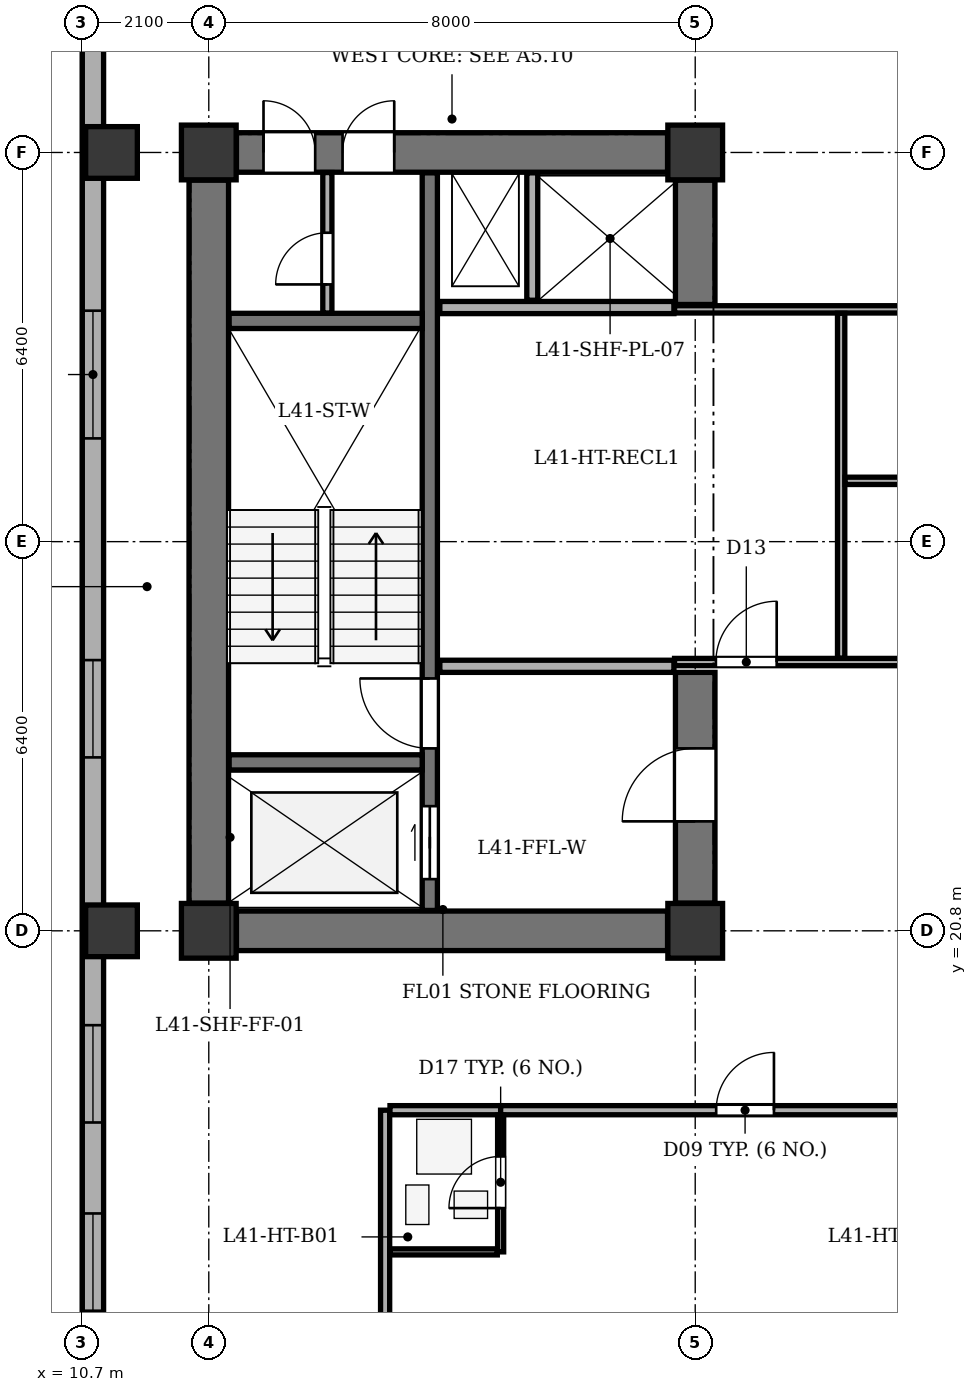
"""IFC4 building model, lengths in metres.
Left out: names, types, materials, properties, quantities, classifications, styles, units other than length and angle.
Written with IfcOpenShell. Run it as: python <this file> out.ifc"""

import sys

from ifc_helpers import new_model, si_unit, direction, frame, frame_2d, origin, origin_2d, place, context, subcontext, project, spatial, rectangle, extrude, element, fill, save


model = new_model("IFC4")
c1 = context("Model", 3, precision=1e-05, world=origin(), true_north=direction((0.0, 1.0)))
c2 = subcontext(c1, "Body", "Model", "MODEL_VIEW")
j1 = project(units=[si_unit("LENGTHUNIT", "METRE"), si_unit("PLANEANGLEUNIT", "RADIAN")], contexts=[c1])
p1 = place(None, origin())
s1 = spatial("IfcSite", under=j1, at=p1, CompositionType="ELEMENT")
p2 = place(p1, origin())
s2 = spatial("IfcBuilding", under=s1, at=p2, CompositionType="ELEMENT")
p3 = place(p2, frame((0.0, 0.0, 162.3)))
s3 = spatial("IfcBuildingStorey", under=s2, at=p3, CompositionType="ELEMENT", Elevation=162.3)
for number, where, z_axis, x_axis in (
    (1, (12.8, 20.8, 0.0), (0.0, 0.0, 1.0), (1.0, 0.0, 0.0)),
    (2, (20.8, 20.8, 0.0), (0.0, 0.0, 1.0), (1.0, 0.0, 0.0)),
    (3, (12.8, 33.6, 0.0), (0.0, 0.0, 1.0), (1.0, 0.0, 0.0)),
    (4, (20.8, 33.6, 0.0), (0.0, 0.0, 1.0), (1.0, 0.0, 0.0)),
):
    element("IfcColumn", number, at=place(p3, frame(where, z_axis=z_axis, x_axis=x_axis)), inside=s3, PredefinedType="COLUMN", context=c2, shape_type="SweptSolid", body=[
        extrude(rectangle(XDim=0.9, YDim=0.9, at=origin_2d()), origin(), (0.0, 0.0, 1.0), 3.5),
    ])
for number, where, z_axis, x_axis in (
    (5, (11.2, 20.8, 0.0), (0.0, 0.0, 1.0), (1.0, 0.0, 0.0)),
    (6, (11.2, 33.6, 0.0), (0.0, 0.0, 1.0), (1.0, 0.0, 0.0)),
):
    element("IfcColumn", number, at=place(p3, frame(where, z_axis=z_axis, x_axis=x_axis)), inside=s3, PredefinedType="COLUMN", context=c2, shape_type="SweptSolid", body=[
        extrude(rectangle(XDim=0.85, YDim=0.85, at=origin_2d()), origin(), (0.0, 0.0, 1.0), 3.5),
    ])
p4 = place(p3, frame((10.895, 12.9, 0.0), z_axis=(0.0, 0.0, 1.0), x_axis=(0.0, 1.0, 0.0)))
e7 = element("IfcWall", 7, at=p4, inside=s3, PredefinedType="STANDARD", context=c2, shape_type="SweptSolid", body=[
    extrude(rectangle(XDim=35.0, YDim=0.35, at=frame_2d((17.5, 0.0))), origin(), (0.0, 0.0, 1.0), 2.785),
])
p5 = place(p4, frame((1.652, 0.0, 0.75)))
e8 = element("IfcOpeningElement", 8, at=p5, cuts=e7, PredefinedType="OPENING", context=c2, shape_type="SweptSolid", body=[
    extrude(rectangle(XDim=1.6, YDim=1.75, at=frame_2d((0.8, 0.875))), frame((0.0, 0.185, 0.0), z_axis=(0.0, -1.0, 0.0), x_axis=(1.0, 0.0, 0.0)), (0.0, 0.0, 1.0), 0.37),
])
p6 = place(p4, frame((4.748, 0.0, 0.75)))
e9 = element("IfcOpeningElement", 9, at=p6, cuts=e7, PredefinedType="OPENING", context=c2, shape_type="SweptSolid", body=[
    extrude(rectangle(XDim=1.6, YDim=1.75, at=frame_2d((0.8, 0.875))), frame((0.0, 0.185, 0.0), z_axis=(0.0, -1.0, 0.0), x_axis=(1.0, 0.0, 0.0)), (0.0, 0.0, 1.0), 0.37),
])
p7 = place(p4, frame((10.752, 0.0, 0.75)))
e10 = element("IfcOpeningElement", 10, at=p7, cuts=e7, PredefinedType="OPENING", context=c2, shape_type="SweptSolid", body=[
    extrude(rectangle(XDim=1.6, YDim=1.75, at=frame_2d((0.8, 0.875))), frame((0.0, 0.185, 0.0), z_axis=(0.0, -1.0, 0.0), x_axis=(1.0, 0.0, 0.0)), (0.0, 0.0, 1.0), 0.37),
])
p8 = place(p4, frame((15.998, 0.0, 0.75)))
e11 = element("IfcOpeningElement", 11, at=p8, cuts=e7, PredefinedType="OPENING", context=c2, shape_type="SweptSolid", body=[
    extrude(rectangle(XDim=2.1, YDim=1.75, at=frame_2d((1.05, 0.875))), frame((0.0, 0.185, 0.0), z_axis=(0.0, -1.0, 0.0), x_axis=(1.0, 0.0, 0.0)), (0.0, 0.0, 1.0), 0.37),
])
p9 = place(p4, frame((23.916, 0.0, 0.75)))
e12 = element("IfcOpeningElement", 12, at=p9, cuts=e7, PredefinedType="OPENING", context=c2, shape_type="SweptSolid", body=[
    extrude(rectangle(XDim=1.6, YDim=1.75, at=frame_2d((0.8, 0.875))), frame((0.0, 0.185, 0.0), z_axis=(0.0, -1.0, 0.0), x_axis=(1.0, 0.0, 0.0)), (0.0, 0.0, 1.0), 0.37),
])
p10 = place(p4, frame((29.834, 0.0, 0.75)))
e13 = element("IfcOpeningElement", 13, at=p10, cuts=e7, PredefinedType="OPENING", context=c2, shape_type="SweptSolid", body=[
    extrude(rectangle(XDim=2.1, YDim=1.75, at=frame_2d((1.05, 0.875))), frame((0.0, 0.185, 0.0), z_axis=(0.0, -1.0, 0.0), x_axis=(1.0, 0.0, 0.0)), (0.0, 0.0, 1.0), 0.37),
])
p11 = place(p3, frame((12.8, 21.255, 0.0), z_axis=(0.0, 0.0, 1.0), x_axis=(0.0, 1.0, 0.0)))
e14 = element("IfcWall", 14, at=p11, inside=s3, PredefinedType="SHEAR", context=c2, shape_type="SweptSolid", body=[
    extrude(rectangle(XDim=11.89, YDim=0.65, at=frame_2d((5.945, 0.0))), origin(), (0.0, 0.0, 1.0), 3.2),
])
p12 = place(p3, frame((13.255, 20.8, 0.0), z_axis=(0.0, 0.0, 1.0), x_axis=(1.0, 0.0, 0.0)))
e15 = element("IfcWall", 15, at=p12, inside=s3, PredefinedType="SHEAR", context=c2, shape_type="SweptSolid", body=[
    extrude(rectangle(XDim=7.09, YDim=0.65, at=frame_2d((3.545, 0.0))), origin(), (0.0, 0.0, 1.0), 3.2),
])
p13 = place(p3, frame((13.255, 33.6, 0.0), z_axis=(0.0, 0.0, 1.0), x_axis=(1.0, 0.0, 0.0)))
e16 = element("IfcWall", 16, at=p13, inside=s3, PredefinedType="SHEAR", context=c2, shape_type="SweptSolid", body=[
    extrude(rectangle(XDim=7.09, YDim=0.65, at=frame_2d((3.545, 0.0))), origin(), (0.0, 0.0, 1.0), 3.2),
])
p14 = place(p13, frame((0.445, 0.0, 0.0)))
e17 = element("IfcOpeningElement", 17, at=p14, cuts=e16, PredefinedType="OPENING", context=c2, shape_type="SweptSolid", body=[
    extrude(rectangle(XDim=0.85, YDim=2.02, at=frame_2d((0.425, 1.01))), frame((0.0, 0.335, 0.0), z_axis=(0.0, -1.0, 0.0), x_axis=(1.0, 0.0, 0.0)), (0.0, 0.0, 1.0), 0.67),
])
p15 = place(p13, frame((1.745, 0.0, 0.0)))
e18 = element("IfcOpeningElement", 18, at=p15, cuts=e16, PredefinedType="OPENING", context=c2, shape_type="SweptSolid", body=[
    extrude(rectangle(XDim=0.85, YDim=2.02, at=frame_2d((0.425, 1.01))), frame((0.0, 0.335, 0.0), z_axis=(0.0, -1.0, 0.0), x_axis=(1.0, 0.0, 0.0)), (0.0, 0.0, 1.0), 0.67),
])
p16 = place(p3, frame((20.8, 21.255, 0.0), z_axis=(0.0, 0.0, 1.0), x_axis=(0.0, 1.0, 0.0)))
e19 = element("IfcWall", 19, at=p16, inside=s3, PredefinedType="SHEAR", context=c2, shape_type="SweptSolid", body=[
    extrude(rectangle(XDim=3.795, YDim=0.65, at=frame_2d((1.897, 0.0))), origin(), (0.0, 0.0, 1.0), 3.2),
])
p17 = place(p16, frame((1.345, 0.0, 0.0)))
e20 = element("IfcOpeningElement", 20, at=p17, cuts=e19, PredefinedType="OPENING", context=c2, shape_type="SweptSolid", body=[
    extrude(rectangle(XDim=1.2, YDim=2.15, at=frame_2d((0.6, 1.075))), frame((0.0, 0.335, 0.0), z_axis=(0.0, -1.0, 0.0), x_axis=(1.0, 0.0, 0.0)), (0.0, 0.0, 1.0), 0.67),
])
p18 = place(p3, frame((20.8, 31.1, 0.0), z_axis=(0.0, 0.0, 1.0), x_axis=(0.0, 1.0, 0.0)))
e21 = element("IfcWall", 21, at=p18, inside=s3, PredefinedType="SHEAR", context=c2, shape_type="SweptSolid", body=[
    extrude(rectangle(XDim=2.045, YDim=0.65, at=frame_2d((1.022, 0.0))), origin(), (0.0, 0.0, 1.0), 3.2),
])
p19 = place(p3, frame((16.435, 21.135, 0.0), z_axis=(0.0, 0.0, 1.0), x_axis=(0.0, 1.0, 0.0)))
e22 = element("IfcWall", 22, at=p19, inside=s3, PredefinedType="SHEAR", context=c2, shape_type="SweptSolid", body=[
    extrude(rectangle(XDim=12.13, YDim=0.25, at=frame_2d((6.065, 0.0))), origin(), (0.0, 0.0, 1.0), 3.2),
])
p20 = place(p19, frame((0.515, 0.0, 0.0)))
e23 = element("IfcOpeningElement", 23, at=p20, cuts=e22, PredefinedType="OPENING", context=c2, shape_type="SweptSolid", body=[
    extrude(rectangle(XDim=1.2, YDim=2.15, at=frame_2d((0.6, 1.075))), frame((0.0, 0.135, 0.0), z_axis=(0.0, -1.0, 0.0), x_axis=(1.0, 0.0, 0.0)), (0.0, 0.0, 1.0), 0.27),
])
p21 = place(p19, frame((2.665, 0.0, 0.0)))
e24 = element("IfcOpeningElement", 24, at=p21, cuts=e22, PredefinedType="OPENING", context=c2, shape_type="SweptSolid", body=[
    extrude(rectangle(XDim=1.15, YDim=2.15, at=frame_2d((0.575, 1.075))), frame((0.0, 0.135, 0.0), z_axis=(0.0, -1.0, 0.0), x_axis=(1.0, 0.0, 0.0)), (0.0, 0.0, 1.0), 0.27),
])
for number, where, z_axis, x_axis in (
    (25, (13.135, 23.57, 0.0), (0.0, 0.0, 1.0), (1.0, 0.0, 0.0)),
    (26, (13.135, 30.83, 0.0), (0.0, 0.0, 1.0), (1.0, 0.0, 0.0)),
):
    element("IfcWall", number, at=place(p3, frame(where, z_axis=z_axis, x_axis=x_axis)), inside=s3, PredefinedType="SHEAR", context=c2, shape_type="SweptSolid", body=[
        extrude(rectangle(XDim=3.175, YDim=0.25, at=frame_2d((1.587, 0.0))), origin(), (0.0, 0.0, 1.0), 3.2),
    ])
for number, where, z_axis, x_axis in (
    (27, (16.6, 25.15, 0.0), (0.0, 0.0, 1.0), (1.0, 0.0, 0.0)),
    (28, (16.6, 31.05, 0.0), (0.0, 0.0, 1.0), (1.0, 0.0, 0.0)),
):
    element("IfcWall", number, at=place(p3, frame(where, z_axis=z_axis, x_axis=x_axis)), inside=s3, PredefinedType="SOLIDWALL", context=c2, shape_type="SweptSolid", body=[
        extrude(rectangle(XDim=3.85, YDim=0.2, at=frame_2d((1.925, 0.0))), origin(), (0.0, 0.0, 1.0), 3.2),
    ])
p22 = place(p3, frame((18.12, 31.17, 0.0), z_axis=(0.0, 0.0, 1.0), x_axis=(0.0, 1.0, 0.0)))
e29 = element("IfcWall", 29, at=p22, inside=s3, PredefinedType="PARTITIONING", context=c2, shape_type="SweptSolid", body=[
    extrude(rectangle(XDim=2.095, YDim=0.18, at=frame_2d((1.047, 0.0))), origin(), (0.0, 0.0, 1.0), 3.2),
])
p23 = place(p3, frame((14.75, 30.96, 0.0), z_axis=(0.0, 0.0, 1.0), x_axis=(0.0, 1.0, 0.0)))
e30 = element("IfcWall", 30, at=p23, inside=s3, PredefinedType="PARTITIONING", context=c2, shape_type="SweptSolid", body=[
    extrude(rectangle(XDim=2.31, YDim=0.15, at=frame_2d((1.155, 0.0))), origin(), (0.0, 0.0, 1.0), 3.2),
])
p24 = place(p23, frame((0.47, 0.0, 0.0)))
e31 = element("IfcOpeningElement", 31, at=p24, cuts=e30, PredefinedType="OPENING", context=c2, shape_type="SweptSolid", body=[
    extrude(rectangle(XDim=0.85, YDim=2.02, at=frame_2d((0.425, 1.01))), frame((0.0, 0.085, 0.0), z_axis=(0.0, -1.0, 0.0), x_axis=(1.0, 0.0, 0.0)), (0.0, 0.0, 1.0), 0.17),
])
p25 = place(p3, frame((20.46, 25.22, 0.0), z_axis=(0.0, 0.0, 1.0), x_axis=(1.0, 0.0, 0.0)))
e32 = element("IfcWall", 32, at=p25, inside=s3, PredefinedType="PARTITIONING", context=c2, shape_type="SweptSolid", body=[
    extrude(rectangle(XDim=11.94, YDim=0.12, at=frame_2d((5.97, 0.0))), origin(), (0.0, 0.0, 1.0), 3.2),
])
p26 = place(p25, frame((0.68, 0.0, 0.0)))
e33 = element("IfcOpeningElement", 33, at=p26, cuts=e32, PredefinedType="OPENING", context=c2, shape_type="SweptSolid", body=[
    extrude(rectangle(XDim=1.0, YDim=2.1, at=frame_2d((0.5, 1.05))), frame((0.0, 0.07, 0.0), z_axis=(0.0, -1.0, 0.0), x_axis=(1.0, 0.0, 0.0)), (0.0, 0.0, 1.0), 0.14),
])
p27 = place(p3, frame((20.46, 31.02, 0.0), z_axis=(0.0, 0.0, 1.0), x_axis=(1.0, 0.0, 0.0)))
e34 = element("IfcWall", 34, at=p27, inside=s3, PredefinedType="PARTITIONING", context=c2, shape_type="SweptSolid", body=[
    extrude(rectangle(XDim=11.94, YDim=0.12, at=frame_2d((5.97, 0.0))), origin(), (0.0, 0.0, 1.0), 3.2),
])
p28 = place(p3, frame((23.2, 25.285, 0.0), z_axis=(0.0, 0.0, 1.0), x_axis=(0.0, 1.0, 0.0)))
e35 = element("IfcWall", 35, at=p28, inside=s3, PredefinedType="PARTITIONING", context=c2, shape_type="SweptSolid", body=[
    extrude(rectangle(XDim=5.67, YDim=0.12, at=frame_2d((2.835, 0.0))), origin(), (0.0, 0.0, 1.0), 3.2),
])
p29 = place(p3, frame((23.265, 28.2, 0.0), z_axis=(0.0, 0.0, 1.0), x_axis=(1.0, 0.0, 0.0)))
e36 = element("IfcWall", 36, at=p29, inside=s3, PredefinedType="PARTITIONING", context=c2, shape_type="SweptSolid", body=[
    extrude(rectangle(XDim=9.07, YDim=0.12, at=frame_2d((4.535, 0.0))), origin(), (0.0, 0.0, 1.0), 3.2),
])
p30 = place(p3, frame((15.7, 8.275, 0.0), z_axis=(0.0, 0.0, 1.0), x_axis=(0.0, 1.0, 0.0)))
e37 = element("IfcWall", 37, at=p30, inside=s3, PredefinedType="PARTITIONING", context=c2, shape_type="SweptSolid", body=[
    extrude(rectangle(XDim=9.575, YDim=0.15, at=frame_2d((4.788, 0.0))), origin(), (0.0, 0.0, 1.0), 3.2),
])
p31 = place(p3, frame((15.78, 17.85, 0.0), z_axis=(0.0, 0.0, 1.0), x_axis=(1.0, 0.0, 0.0)))
e38 = element("IfcWall", 38, at=p31, inside=s3, PredefinedType="PARTITIONING", context=c2, shape_type="SweptSolid", body=[
    extrude(rectangle(XDim=1.82, YDim=0.15, at=frame_2d((0.91, 0.0))), origin(), (0.0, 0.0, 1.0), 3.2),
])
p32 = place(p3, frame((17.6, 17.85, 0.0), z_axis=(0.0, 0.0, 1.0), x_axis=(1.0, 0.0, 0.0)))
e39 = element("IfcWall", 39, at=p32, inside=s3, PredefinedType="PARTITIONING", context=c2, shape_type="SweptSolid", body=[
    extrude(rectangle(XDim=8.049, YDim=0.15, at=frame_2d((4.024, 0.0))), origin(), (0.0, 0.0, 1.0), 3.2),
])
p33 = place(p32, frame((3.545, 0.0, 0.0)))
e40 = element("IfcOpeningElement", 40, at=p33, cuts=e39, PredefinedType="OPENING", context=c2, shape_type="SweptSolid", body=[
    extrude(rectangle(XDim=0.95, YDim=2.1, at=frame_2d((0.475, 1.05))), frame((0.0, 0.085, 0.0), z_axis=(0.0, -1.0, 0.0), x_axis=(1.0, 0.0, 0.0)), (0.0, 0.0, 1.0), 0.17),
])
p34 = place(p3, frame((17.6, 15.52, 0.0), z_axis=(0.0, 0.0, 1.0), x_axis=(0.0, 1.0, 0.0)))
e41 = element("IfcWall", 41, at=p34, inside=s3, PredefinedType="PARTITIONING", context=c2, shape_type="SweptSolid", body=[
    extrude(rectangle(XDim=2.25, YDim=0.1, at=frame_2d((1.125, 0.0))), origin(), (0.0, 0.0, 1.0), 3.2),
])
p35 = place(p34, frame((0.72, 0.0, 0.0)))
e42 = element("IfcOpeningElement", 42, at=p35, cuts=e41, PredefinedType="OPENING", context=c2, shape_type="SweptSolid", body=[
    extrude(rectangle(XDim=0.85, YDim=2.05, at=frame_2d((0.425, 1.025))), frame((0.0, 0.06, 0.0), z_axis=(0.0, -1.0, 0.0), x_axis=(1.0, 0.0, 0.0)), (0.0, 0.0, 1.0), 0.12),
])
p36 = place(p3, frame((15.78, 15.52, 0.0), z_axis=(0.0, 0.0, 1.0), x_axis=(1.0, 0.0, 0.0)))
e43 = element("IfcWall", 43, at=p36, inside=s3, PredefinedType="PARTITIONING", context=c2, shape_type="SweptSolid", body=[
    extrude(rectangle(XDim=1.765, YDim=0.1, at=frame_2d((0.882, 0.0))), origin(), (0.0, 0.0, 1.0), 3.2),
])
p37 = place(p5, origin())
e44 = element("IfcWindow", 44, at=p37, inside=s3, PartitioningType="SINGLE_PANEL", PredefinedType="WINDOW", context=c2, shape_type="SweptSolid", body=[
    extrude(rectangle(XDim=1.6, YDim=1.75, at=frame_2d((0.8, 0.875))), frame((0.0, -0.01, 0.0), z_axis=(0.0, -1.0, 0.0), x_axis=(1.0, 0.0, 0.0)), (0.0, 0.0, 1.0), 0.06),
])
fill(e8, e44)
p38 = place(p6, origin())
e45 = element("IfcWindow", 45, at=p38, inside=s3, PartitioningType="SINGLE_PANEL", PredefinedType="WINDOW", context=c2, shape_type="SweptSolid", body=[
    extrude(rectangle(XDim=1.6, YDim=1.75, at=frame_2d((0.8, 0.875))), frame((0.0, -0.01, 0.0), z_axis=(0.0, -1.0, 0.0), x_axis=(1.0, 0.0, 0.0)), (0.0, 0.0, 1.0), 0.06),
])
fill(e9, e45)
p39 = place(p7, origin())
e46 = element("IfcWindow", 46, at=p39, inside=s3, PartitioningType="SINGLE_PANEL", PredefinedType="WINDOW", context=c2, shape_type="SweptSolid", body=[
    extrude(rectangle(XDim=1.6, YDim=1.75, at=frame_2d((0.8, 0.875))), frame((0.0, -0.01, 0.0), z_axis=(0.0, -1.0, 0.0), x_axis=(1.0, 0.0, 0.0)), (0.0, 0.0, 1.0), 0.06),
])
fill(e10, e46)
p40 = place(p8, origin())
e47 = element("IfcWindow", 47, at=p40, inside=s3, PartitioningType="SINGLE_PANEL", PredefinedType="WINDOW", context=c2, shape_type="SweptSolid", body=[
    extrude(rectangle(XDim=2.1, YDim=1.75, at=frame_2d((1.05, 0.875))), frame((0.0, -0.01, 0.0), z_axis=(0.0, -1.0, 0.0), x_axis=(1.0, 0.0, 0.0)), (0.0, 0.0, 1.0), 0.06),
])
fill(e11, e47)
p41 = place(p14, origin())
e48 = element("IfcDoor", 48, at=p41, inside=s3, OperationType="SINGLE_SWING_LEFT", PredefinedType="DOOR", context=c2, shape_type="SweptSolid", body=[
    extrude(rectangle(XDim=0.85, YDim=2.02, at=frame_2d((0.425, 1.01))), frame((0.0, 0.025, 0.0), z_axis=(0.0, -1.0, 0.0), x_axis=(1.0, 0.0, 0.0)), (0.0, 0.0, 1.0), 0.05),
])
fill(e17, e48)
p42 = place(p15, origin())
e49 = element("IfcDoor", 49, at=p42, inside=s3, OperationType="SINGLE_SWING_RIGHT", PredefinedType="DOOR", context=c2, shape_type="SweptSolid", body=[
    extrude(rectangle(XDim=0.85, YDim=2.02, at=frame_2d((0.425, 1.01))), frame((0.0, 0.025, 0.0), z_axis=(0.0, -1.0, 0.0), x_axis=(1.0, 0.0, 0.0)), (0.0, 0.0, 1.0), 0.05),
])
fill(e18, e49)
p43 = place(p17, origin())
e50 = element("IfcDoor", 50, at=p43, inside=s3, OperationType="SINGLE_SWING_LEFT", PredefinedType="DOOR", context=c2, shape_type="SweptSolid", body=[
    extrude(rectangle(XDim=1.2, YDim=2.15, at=frame_2d((0.6, 1.075))), frame((0.0, 0.025, 0.0), z_axis=(0.0, -1.0, 0.0), x_axis=(1.0, 0.0, 0.0)), (0.0, 0.0, 1.0), 0.05),
])
fill(e20, e50)
p44 = place(p20, origin())
e51 = element("IfcDoor", 51, at=p44, inside=s3, OperationType="DOUBLE_DOOR_SLIDING", PredefinedType="DOOR", context=c2, shape_type="SweptSolid", body=[
    extrude(rectangle(XDim=1.2, YDim=2.15, at=frame_2d((0.6, 1.075))), frame((0.0, 0.025, 0.0), z_axis=(0.0, -1.0, 0.0), x_axis=(1.0, 0.0, 0.0)), (0.0, 0.0, 1.0), 0.05),
])
fill(e23, e51)
p45 = place(p21, origin())
e52 = element("IfcDoor", 52, at=p45, inside=s3, OperationType="SINGLE_SWING_RIGHT", PredefinedType="DOOR", context=c2, shape_type="SweptSolid", body=[
    extrude(rectangle(XDim=1.15, YDim=2.15, at=frame_2d((0.575, 1.075))), frame((0.0, 0.025, 0.0), z_axis=(0.0, -1.0, 0.0), x_axis=(1.0, 0.0, 0.0)), (0.0, 0.0, 1.0), 0.05),
])
fill(e24, e52)
p46 = place(p24, origin())
e53 = element("IfcDoor", 53, at=p46, inside=s3, OperationType="SINGLE_SWING_LEFT", PredefinedType="DOOR", context=c2, shape_type="SweptSolid", body=[
    extrude(rectangle(XDim=0.85, YDim=2.02, at=frame_2d((0.425, 1.01))), frame((0.0, 0.025, 0.0), z_axis=(0.0, -1.0, 0.0), x_axis=(1.0, 0.0, 0.0)), (0.0, 0.0, 1.0), 0.05),
])
fill(e31, e53)
p47 = place(p26, origin())
e54 = element("IfcDoor", 54, at=p47, inside=s3, OperationType="SINGLE_SWING_RIGHT", PredefinedType="DOOR", context=c2, shape_type="SweptSolid", body=[
    extrude(rectangle(XDim=1.0, YDim=2.1, at=frame_2d((0.5, 1.05))), frame((0.0, 0.025, 0.0), z_axis=(0.0, -1.0, 0.0), x_axis=(1.0, 0.0, 0.0)), (0.0, 0.0, 1.0), 0.05),
])
fill(e33, e54)
p48 = place(p35, origin())
e55 = element("IfcDoor", 55, at=p48, inside=s3, OperationType="SINGLE_SWING_LEFT", PredefinedType="DOOR", context=c2, shape_type="SweptSolid", body=[
    extrude(rectangle(XDim=0.85, YDim=2.05, at=frame_2d((0.425, 1.025))), frame((0.0, 0.025, 0.0), z_axis=(0.0, -1.0, 0.0), x_axis=(1.0, 0.0, 0.0)), (0.0, 0.0, 1.0), 0.05),
])
fill(e42, e55)
p49 = place(p33, origin())
e56 = element("IfcDoor", 56, at=p49, inside=s3, OperationType="SINGLE_SWING_RIGHT", PredefinedType="DOOR", context=c2, shape_type="SweptSolid", body=[
    extrude(rectangle(XDim=0.95, YDim=2.1, at=frame_2d((0.475, 1.05))), frame((0.0, 0.025, 0.0), z_axis=(0.0, -1.0, 0.0), x_axis=(1.0, 0.0, 0.0)), (0.0, 0.0, 1.0), 0.05),
])
fill(e40, e56)
save(model, sys.argv[1])
